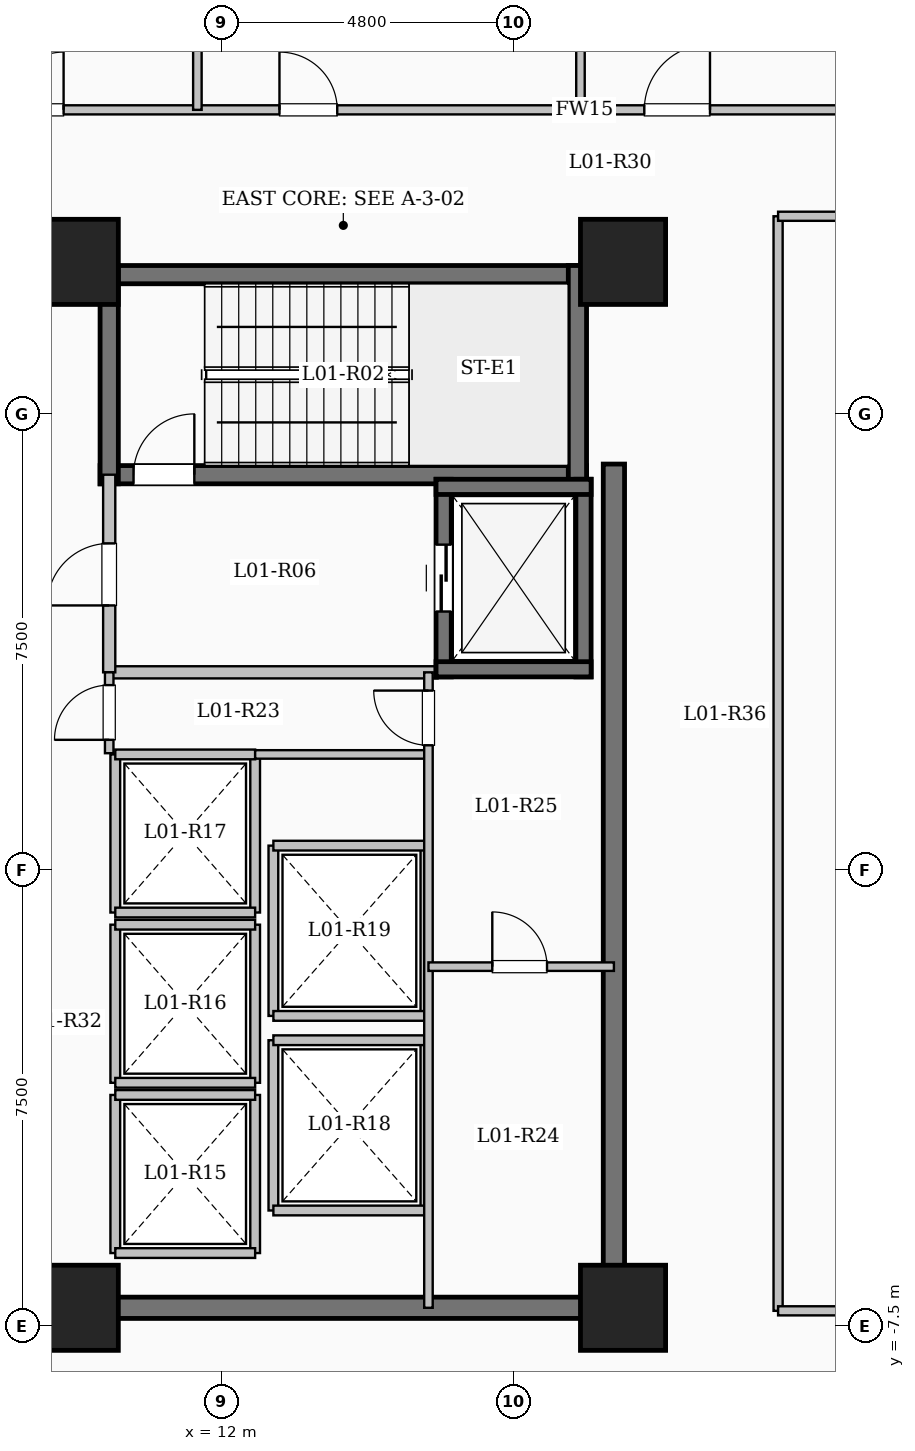
"""IFC4 building model, lengths in metres.
Left out: names, types, materials, properties, quantities, classifications, styles, units other than length and angle.
Written with IfcOpenShell. Run it as: python <this file> out.ifc"""

import sys

from ifc_helpers import new_model, si_unit, direction, frame, frame_2d, origin, origin_2d, place, context, subcontext, project, spatial, rectangle, extrude, element, fill, save


model = new_model("IFC4")
c1 = context("Model", 3, precision=1e-05, world=origin(), true_north=direction((0.0, 1.0)))
c2 = subcontext(c1, "Body", "Model", "MODEL_VIEW")
j1 = project(units=[si_unit("LENGTHUNIT", "METRE"), si_unit("PLANEANGLEUNIT", "RADIAN")], contexts=[c1])
p1 = place(None, origin())
s1 = spatial("IfcSite", under=j1, at=p1, CompositionType="ELEMENT")
p2 = place(p1, origin())
s2 = spatial("IfcBuilding", under=s1, at=p2, CompositionType="ELEMENT")
p3 = place(p2, frame((0.0, 0.0, 5.4)))
s3 = spatial("IfcBuildingStorey", under=s2, at=p3, CompositionType="ELEMENT", Elevation=5.4)
for number, where, z_axis, x_axis in (
    (1, (9.6, -7.2, 0.0), (0.0, 0.0, 1.0), (1.0, 0.0, 0.0)),
    (2, (9.6, 10.0, 0.0), (0.0, 0.0, 1.0), (1.0, 0.0, 0.0)),
    (3, (18.6, -7.2, 0.0), (0.0, 0.0, 1.0), (1.0, 0.0, 0.0)),
    (4, (18.6, 10.0, 0.0), (0.0, 0.0, 1.0), (1.0, 0.0, 0.0)),
):
    element("IfcColumn", number, at=place(p3, frame(where, z_axis=z_axis, x_axis=x_axis)), inside=s3, PredefinedType="COLUMN", context=c2, shape_type="SweptSolid", body=[
        extrude(rectangle(XDim=1.4, YDim=1.4, at=origin_2d()), origin(), (0.0, 0.0, 1.0), 4.5),
    ])
p4 = place(p3, frame((10.0, 9.79, 0.0), z_axis=(0.0, 0.0, 1.0), x_axis=(1.0, 0.0, 0.0)))
e5 = element("IfcWall", 5, at=p4, inside=s3, PredefinedType="SHEAR", context=c2, shape_type="SweptSolid", body=[
    extrude(rectangle(XDim=8.0, YDim=0.3, at=frame_2d((4.0, 0.0))), origin(), (0.0, 0.0, 1.0), 4.5),
])
p5 = place(p3, frame((10.0, 6.5, 0.0), z_axis=(0.0, 0.0, 1.0), x_axis=(1.0, 0.0, 0.0)))
e6 = element("IfcWall", 6, at=p5, inside=s3, PredefinedType="SHEAR", context=c2, shape_type="SweptSolid", body=[
    extrude(rectangle(XDim=8.0, YDim=0.3, at=frame_2d((4.0, 0.0))), origin(), (0.0, 0.0, 1.0), 4.5),
])
p6 = place(p5, frame((0.55, 0.0, 0.0)))
e7 = element("IfcOpeningElement", 7, at=p6, cuts=e6, PredefinedType="OPENING", context=c2, shape_type="SweptSolid", body=[
    extrude(rectangle(XDim=1.0, YDim=2.15, at=frame_2d((0.5, 1.075))), frame((0.0, 0.16, 0.0), z_axis=(0.0, -1.0, 0.0), x_axis=(1.0, 0.0, 0.0)), (0.0, 0.0, 1.0), 0.32),
])
for number, where, z_axis, x_axis in (
    (8, (10.15, 6.35, 0.0), (0.0, 0.0, 1.0), (0.0, 1.0, 0.0)),
    (9, (17.85, 6.35, 0.0), (0.0, 0.0, 1.0), (0.0, 1.0, 0.0)),
):
    element("IfcWall", number, at=place(p3, frame(where, z_axis=z_axis, x_axis=x_axis)), inside=s3, PredefinedType="SHEAR", context=c2, shape_type="SweptSolid", body=[
        extrude(rectangle(XDim=3.59, YDim=0.3, at=frame_2d((1.795, 0.0))), origin(), (0.0, 0.0, 1.0), 4.5),
    ])
p7 = place(p3, frame((10.15, 3.25, 0.0), z_axis=(0.0, 0.0, 1.0), x_axis=(1.0, 0.0, 0.0)))
e10 = element("IfcWall", 10, at=p7, inside=s3, PredefinedType="SOLIDWALL", context=c2, shape_type="SweptSolid", body=[
    extrude(rectangle(XDim=5.4, YDim=0.2, at=frame_2d((2.7, 0.0))), origin(), (0.0, 0.0, 1.0), 4.2),
])
p8 = place(p3, frame((10.15, 3.25, 0.0), z_axis=(0.0, 0.0, 1.0), x_axis=(0.0, 1.0, 0.0)))
e11 = element("IfcWall", 11, at=p8, inside=s3, PredefinedType="SOLIDWALL", context=c2, shape_type="SweptSolid", body=[
    extrude(rectangle(XDim=3.25, YDim=0.2, at=frame_2d((1.625, 0.0))), origin(), (0.0, 0.0, 1.0), 4.2),
])
p9 = place(p8, frame((1.1, 0.0, 0.0)))
e12 = element("IfcOpeningElement", 12, at=p9, cuts=e11, PredefinedType="OPENING", context=c2, shape_type="SweptSolid", body=[
    extrude(rectangle(XDim=1.02, YDim=2.15, at=frame_2d((0.51, 1.075))), frame((0.0, 0.11, 0.0), z_axis=(0.0, -1.0, 0.0), x_axis=(1.0, 0.0, 0.0)), (0.0, 0.0, 1.0), 0.22),
])
p10 = place(p3, frame((15.65, 3.175, 0.0), z_axis=(0.0, 0.0, 1.0), x_axis=(0.0, 1.0, 0.0)))
e13 = element("IfcWall", 13, at=p10, inside=s3, PredefinedType="SHEAR", context=c2, shape_type="SweptSolid", body=[
    extrude(rectangle(XDim=3.25, YDim=0.25, at=frame_2d((1.625, 0.0))), origin(), (0.0, 0.0, 1.0), 4.5),
])
p11 = place(p10, frame((1.075, 0.0, 0.0)))
e14 = element("IfcOpeningElement", 14, at=p11, cuts=e13, PredefinedType="OPENING", context=c2, shape_type="SweptSolid", body=[
    extrude(rectangle(XDim=1.1, YDim=2.15, at=frame_2d((0.55, 1.075))), frame((0.0, 0.135, 0.0), z_axis=(0.0, -1.0, 0.0), x_axis=(1.0, 0.0, 0.0)), (0.0, 0.0, 1.0), 0.27),
])
p12 = place(p3, frame((17.95, 3.175, 0.0), z_axis=(0.0, 0.0, 1.0), x_axis=(0.0, 1.0, 0.0)))
e15 = element("IfcWall", 15, at=p12, inside=s3, PredefinedType="SHEAR", context=c2, shape_type="SweptSolid", body=[
    extrude(rectangle(XDim=3.25, YDim=0.25, at=frame_2d((1.625, 0.0))), origin(), (0.0, 0.0, 1.0), 4.5),
])
for number, where, z_axis, x_axis in (
    (16, (15.525, 3.3, 0.0), (0.0, 0.0, 1.0), (1.0, 0.0, 0.0)),
    (17, (15.525, 6.3, 0.0), (0.0, 0.0, 1.0), (1.0, 0.0, 0.0)),
):
    element("IfcWall", number, at=place(p3, frame(where, z_axis=z_axis, x_axis=x_axis)), inside=s3, PredefinedType="SHEAR", context=c2, shape_type="SweptSolid", body=[
        extrude(rectangle(XDim=2.55, YDim=0.25, at=frame_2d((1.275, 0.0))), origin(), (0.0, 0.0, 1.0), 4.5),
    ])
for number, where, z_axis, x_axis in (
    (18, (10.25, -6.3, 0.0), (0.0, 0.0, 1.0), (0.0, 1.0, 0.0)),
    (19, (12.55, -6.3, 0.0), (0.0, 0.0, 1.0), (0.0, 1.0, 0.0)),
):
    element("IfcWall", number, at=place(p3, frame(where, z_axis=z_axis, x_axis=x_axis)), inside=s3, PredefinedType="SOLIDWALL", context=c2, shape_type="SweptSolid", body=[
        extrude(rectangle(XDim=2.6, YDim=0.16, at=frame_2d((1.3, 0.0))), origin(), (0.0, 0.0, 1.0), 4.2),
    ])
for number, where, z_axis, x_axis in (
    (20, (10.25, -6.3, 0.0), (0.0, 0.0, 1.0), (1.0, 0.0, 0.0)),
    (21, (10.25, -3.7, 0.0), (0.0, 0.0, 1.0), (1.0, 0.0, 0.0)),
):
    element("IfcWall", number, at=place(p3, frame(where, z_axis=z_axis, x_axis=x_axis)), inside=s3, PredefinedType="SOLIDWALL", context=c2, shape_type="SweptSolid", body=[
        extrude(rectangle(XDim=2.3, YDim=0.16, at=frame_2d((1.15, 0.0))), origin(), (0.0, 0.0, 1.0), 4.2),
    ])
for number, where, z_axis, x_axis in (
    (22, (10.25, -3.5, 0.0), (0.0, 0.0, 1.0), (0.0, 1.0, 0.0)),
    (23, (12.55, -3.5, 0.0), (0.0, 0.0, 1.0), (0.0, 1.0, 0.0)),
):
    element("IfcWall", number, at=place(p3, frame(where, z_axis=z_axis, x_axis=x_axis)), inside=s3, PredefinedType="SOLIDWALL", context=c2, shape_type="SweptSolid", body=[
        extrude(rectangle(XDim=2.6, YDim=0.16, at=frame_2d((1.3, 0.0))), origin(), (0.0, 0.0, 1.0), 4.2),
    ])
for number, where, z_axis, x_axis in (
    (24, (10.25, -3.5, 0.0), (0.0, 0.0, 1.0), (1.0, 0.0, 0.0)),
    (25, (10.25, -0.9, 0.0), (0.0, 0.0, 1.0), (1.0, 0.0, 0.0)),
):
    element("IfcWall", number, at=place(p3, frame(where, z_axis=z_axis, x_axis=x_axis)), inside=s3, PredefinedType="SOLIDWALL", context=c2, shape_type="SweptSolid", body=[
        extrude(rectangle(XDim=2.3, YDim=0.16, at=frame_2d((1.15, 0.0))), origin(), (0.0, 0.0, 1.0), 4.2),
    ])
for number, where, z_axis, x_axis in (
    (26, (10.25, -0.7, 0.0), (0.0, 0.0, 1.0), (0.0, 1.0, 0.0)),
    (27, (12.55, -0.7, 0.0), (0.0, 0.0, 1.0), (0.0, 1.0, 0.0)),
):
    element("IfcWall", number, at=place(p3, frame(where, z_axis=z_axis, x_axis=x_axis)), inside=s3, PredefinedType="SOLIDWALL", context=c2, shape_type="SweptSolid", body=[
        extrude(rectangle(XDim=2.6, YDim=0.16, at=frame_2d((1.3, 0.0))), origin(), (0.0, 0.0, 1.0), 4.2),
    ])
for number, where, z_axis, x_axis in (
    (28, (10.25, -0.7, 0.0), (0.0, 0.0, 1.0), (1.0, 0.0, 0.0)),
    (29, (10.25, 1.9, 0.0), (0.0, 0.0, 1.0), (1.0, 0.0, 0.0)),
):
    element("IfcWall", number, at=place(p3, frame(where, z_axis=z_axis, x_axis=x_axis)), inside=s3, PredefinedType="SOLIDWALL", context=c2, shape_type="SweptSolid", body=[
        extrude(rectangle(XDim=2.3, YDim=0.16, at=frame_2d((1.15, 0.0))), origin(), (0.0, 0.0, 1.0), 4.2),
    ])
for number, where, z_axis, x_axis in (
    (30, (12.85, -5.6, 0.0), (0.0, 0.0, 1.0), (0.0, 1.0, 0.0)),
    (31, (15.35, -5.6, 0.0), (0.0, 0.0, 1.0), (0.0, 1.0, 0.0)),
):
    element("IfcWall", number, at=place(p3, frame(where, z_axis=z_axis, x_axis=x_axis)), inside=s3, PredefinedType="SOLIDWALL", context=c2, shape_type="SweptSolid", body=[
        extrude(rectangle(XDim=2.8, YDim=0.16, at=frame_2d((1.4, 0.0))), origin(), (0.0, 0.0, 1.0), 4.2),
    ])
for number, where, z_axis, x_axis in (
    (32, (12.85, -5.6, 0.0), (0.0, 0.0, 1.0), (1.0, 0.0, 0.0)),
    (33, (12.85, -2.8, 0.0), (0.0, 0.0, 1.0), (1.0, 0.0, 0.0)),
):
    element("IfcWall", number, at=place(p3, frame(where, z_axis=z_axis, x_axis=x_axis)), inside=s3, PredefinedType="SOLIDWALL", context=c2, shape_type="SweptSolid", body=[
        extrude(rectangle(XDim=2.5, YDim=0.16, at=frame_2d((1.25, 0.0))), origin(), (0.0, 0.0, 1.0), 4.2),
    ])
for number, where, z_axis, x_axis in (
    (34, (12.85, -2.4, 0.0), (0.0, 0.0, 1.0), (0.0, 1.0, 0.0)),
    (35, (15.35, -2.4, 0.0), (0.0, 0.0, 1.0), (0.0, 1.0, 0.0)),
):
    element("IfcWall", number, at=place(p3, frame(where, z_axis=z_axis, x_axis=x_axis)), inside=s3, PredefinedType="SOLIDWALL", context=c2, shape_type="SweptSolid", body=[
        extrude(rectangle(XDim=2.8, YDim=0.16, at=frame_2d((1.4, 0.0))), origin(), (0.0, 0.0, 1.0), 4.2),
    ])
for number, where, z_axis, x_axis in (
    (36, (12.85, -2.4, 0.0), (0.0, 0.0, 1.0), (1.0, 0.0, 0.0)),
    (37, (12.85, 0.4, 0.0), (0.0, 0.0, 1.0), (1.0, 0.0, 0.0)),
):
    element("IfcWall", number, at=place(p3, frame(where, z_axis=z_axis, x_axis=x_axis)), inside=s3, PredefinedType="SOLIDWALL", context=c2, shape_type="SweptSolid", body=[
        extrude(rectangle(XDim=2.5, YDim=0.16, at=frame_2d((1.25, 0.0))), origin(), (0.0, 0.0, 1.0), 4.2),
    ])
p13 = place(p3, frame((18.45, -7.375, 0.0), z_axis=(0.0, 0.0, 1.0), x_axis=(0.0, 1.0, 0.0)))
e38 = element("IfcWall", 38, at=p13, inside=s3, PredefinedType="SHEAR", context=c2, shape_type="SweptSolid", body=[
    extrude(rectangle(XDim=14.05, YDim=0.35, at=frame_2d((7.025, 0.0))), origin(), (0.0, 0.0, 1.0), 4.5),
])
p14 = place(p3, frame((10.075, -7.2, 0.0), z_axis=(0.0, 0.0, 1.0), x_axis=(1.0, 0.0, 0.0)))
e39 = element("IfcWall", 39, at=p14, inside=s3, PredefinedType="SHEAR", context=c2, shape_type="SweptSolid", body=[
    extrude(rectangle(XDim=8.55, YDim=0.35, at=frame_2d((4.275, 0.0))), origin(), (0.0, 0.0, 1.0), 4.5),
])
p15 = place(p3, frame((12.55, 1.9, 0.0), z_axis=(0.0, 0.0, 1.0), x_axis=(1.0, 0.0, 0.0)))
e40 = element("IfcWall", 40, at=p15, inside=s3, PredefinedType="PARTITIONING", context=c2, shape_type="SweptSolid", body=[
    extrude(rectangle(XDim=2.85, YDim=0.14, at=frame_2d((1.425, 0.0))), origin(), (0.0, 0.0, 1.0), 4.2),
])
p16 = place(p3, frame((10.15, 1.92, 0.0), z_axis=(0.0, 0.0, 1.0), x_axis=(0.0, 1.0, 0.0)))
e41 = element("IfcWall", 41, at=p16, inside=s3, PredefinedType="PARTITIONING", context=c2, shape_type="SweptSolid", body=[
    extrude(rectangle(XDim=1.33, YDim=0.14, at=frame_2d((0.665, 0.0))), origin(), (0.0, 0.0, 1.0), 4.2),
])
p17 = place(p16, frame((0.22, 0.0, 0.0)))
e42 = element("IfcOpeningElement", 42, at=p17, cuts=e41, PredefinedType="OPENING", context=c2, shape_type="SweptSolid", body=[
    extrude(rectangle(XDim=0.9, YDim=2.08, at=frame_2d((0.45, 1.04))), frame((0.0, 0.08, 0.0), z_axis=(0.0, -1.0, 0.0), x_axis=(1.0, 0.0, 0.0)), (0.0, 0.0, 1.0), 0.16),
])
p18 = place(p3, frame((15.4, -7.2, 0.0), z_axis=(0.0, 0.0, 1.0), x_axis=(0.0, 1.0, 0.0)))
e43 = element("IfcWall", 43, at=p18, inside=s3, PredefinedType="PARTITIONING", context=c2, shape_type="SweptSolid", body=[
    extrude(rectangle(XDim=10.45, YDim=0.14, at=frame_2d((5.225, 0.0))), origin(), (0.0, 0.0, 1.0), 4.2),
])
p19 = place(p18, frame((9.25, 0.0, 0.0)))
e44 = element("IfcOpeningElement", 44, at=p19, cuts=e43, PredefinedType="OPENING", context=c2, shape_type="SweptSolid", body=[
    extrude(rectangle(XDim=0.9, YDim=2.08, at=frame_2d((0.45, 1.04))), frame((0.0, 0.08, 0.0), z_axis=(0.0, -1.0, 0.0), x_axis=(1.0, 0.0, 0.0)), (0.0, 0.0, 1.0), 0.16),
])
p20 = place(p3, frame((15.4, -1.59, 0.0), z_axis=(0.0, 0.0, 1.0), x_axis=(1.0, 0.0, 0.0)))
e45 = element("IfcWall", 45, at=p20, inside=s3, PredefinedType="PARTITIONING", context=c2, shape_type="SweptSolid", body=[
    extrude(rectangle(XDim=3.05, YDim=0.14, at=frame_2d((1.525, 0.0))), origin(), (0.0, 0.0, 1.0), 4.2),
])
p21 = place(p20, frame((1.05, 0.0, 0.0)))
e46 = element("IfcOpeningElement", 46, at=p21, cuts=e45, PredefinedType="OPENING", context=c2, shape_type="SweptSolid", body=[
    extrude(rectangle(XDim=0.9, YDim=2.08, at=frame_2d((0.45, 1.04))), frame((0.0, 0.08, 0.0), z_axis=(0.0, -1.0, 0.0), x_axis=(1.0, 0.0, 0.0)), (0.0, 0.0, 1.0), 0.16),
])
p22 = place(p3, frame((3.85, 12.5, 0.0), z_axis=(0.0, 0.0, 1.0), x_axis=(1.0, 0.0, 0.0)))
e47 = element("IfcWall", 47, at=p22, inside=s3, PredefinedType="PARTITIONING", context=c2, shape_type="SweptSolid", body=[
    extrude(rectangle(XDim=29.03, YDim=0.15, at=frame_2d((14.515, 0.0))), origin(), (0.0, 0.0, 1.0), 4.2),
])
p23 = place(p22, frame((1.2, 0.0, 0.0)))
e48 = element("IfcOpeningElement", 48, at=p23, cuts=e47, PredefinedType="OPENING", context=c2, shape_type="SweptSolid", body=[
    extrude(rectangle(XDim=0.95, YDim=2.15, at=frame_2d((0.475, 1.075))), frame((0.0, 0.085, 0.0), z_axis=(0.0, -1.0, 0.0), x_axis=(1.0, 0.0, 0.0)), (0.0, 0.0, 1.0), 0.17),
])
p24 = place(p22, frame((4.6, 0.0, 0.0)))
e49 = element("IfcOpeningElement", 49, at=p24, cuts=e47, PredefinedType="OPENING", context=c2, shape_type="SweptSolid", body=[
    extrude(rectangle(XDim=0.95, YDim=2.15, at=frame_2d((0.475, 1.075))), frame((0.0, 0.085, 0.0), z_axis=(0.0, -1.0, 0.0), x_axis=(1.0, 0.0, 0.0)), (0.0, 0.0, 1.0), 0.17),
])
p25 = place(p22, frame((9.1, 0.0, 0.0)))
e50 = element("IfcOpeningElement", 50, at=p25, cuts=e47, PredefinedType="OPENING", context=c2, shape_type="SweptSolid", body=[
    extrude(rectangle(XDim=0.95, YDim=2.15, at=frame_2d((0.475, 1.075))), frame((0.0, 0.085, 0.0), z_axis=(0.0, -1.0, 0.0), x_axis=(1.0, 0.0, 0.0)), (0.0, 0.0, 1.0), 0.17),
])
p26 = place(p22, frame((15.1, 0.0, 0.0)))
e51 = element("IfcOpeningElement", 51, at=p26, cuts=e47, PredefinedType="OPENING", context=c2, shape_type="SweptSolid", body=[
    extrude(rectangle(XDim=1.08, YDim=2.15, at=frame_2d((0.54, 1.075))), frame((0.0, 0.085, 0.0), z_axis=(0.0, -1.0, 0.0), x_axis=(1.0, 0.0, 0.0)), (0.0, 0.0, 1.0), 0.17),
])
p27 = place(p22, frame((25.93, 0.0, 0.0)))
e52 = element("IfcOpeningElement", 52, at=p27, cuts=e47, PredefinedType="OPENING", context=c2, shape_type="SweptSolid", body=[
    extrude(rectangle(XDim=1.08, YDim=2.15, at=frame_2d((0.54, 1.075))), frame((0.0, 0.085, 0.0), z_axis=(0.0, -1.0, 0.0), x_axis=(1.0, 0.0, 0.0)), (0.0, 0.0, 1.0), 0.17),
])
p28 = place(p3, frame((21.15, -7.25, 0.0), z_axis=(0.0, 0.0, 1.0), x_axis=(0.0, 1.0, 0.0)))
e53 = element("IfcWall", 53, at=p28, inside=s3, PredefinedType="PARTITIONING", context=c2, shape_type="SweptSolid", body=[
    extrude(rectangle(XDim=18.0, YDim=0.15, at=frame_2d((9.0, 0.0))), origin(), (0.0, 0.0, 1.0), 4.2),
])
p29 = place(p3, frame((11.6, 12.5, 0.0), z_axis=(0.0, 0.0, 1.0), x_axis=(0.0, 1.0, 0.0)))
e54 = element("IfcWall", 54, at=p29, inside=s3, PredefinedType="PARTITIONING", context=c2, shape_type="SweptSolid", body=[
    extrude(rectangle(XDim=17.38, YDim=0.14, at=frame_2d((8.69, 0.0))), origin(), (0.0, 0.0, 1.0), 4.2),
])
p30 = place(p3, frame((17.9, 12.5, 0.0), z_axis=(0.0, 0.0, 1.0), x_axis=(0.0, 1.0, 0.0)))
e55 = element("IfcWall", 55, at=p30, inside=s3, PredefinedType="PARTITIONING", context=c2, shape_type="SweptSolid", body=[
    extrude(rectangle(XDim=17.38, YDim=0.14, at=frame_2d((8.69, 0.0))), origin(), (0.0, 0.0, 1.0), 3.385),
])
p31 = place(p3, frame((21.15, -7.25, 0.0), z_axis=(0.0, 0.0, 1.0), x_axis=(1.0, 0.0, 0.0)))
e56 = element("IfcWall", 56, at=p31, inside=s3, PredefinedType="PARTITIONING", context=c2, shape_type="SweptSolid", body=[
    extrude(rectangle(XDim=11.73, YDim=0.15, at=frame_2d((5.865, 0.0))), origin(), (0.0, 0.0, 1.0), 4.2),
])
p32 = place(p31, frame((2.5, 0.0, 0.0)))
e57 = element("IfcOpeningElement", 57, at=p32, cuts=e56, PredefinedType="OPENING", context=c2, shape_type="SweptSolid", body=[
    extrude(rectangle(XDim=1.08, YDim=2.15, at=frame_2d((0.54, 1.075))), frame((0.0, 0.085, 0.0), z_axis=(0.0, -1.0, 0.0), x_axis=(1.0, 0.0, 0.0)), (0.0, 0.0, 1.0), 0.17),
])
p33 = place(p3, frame((21.15, 10.75, 0.0), z_axis=(0.0, 0.0, 1.0), x_axis=(1.0, 0.0, 0.0)))
e58 = element("IfcWall", 58, at=p33, inside=s3, PredefinedType="PARTITIONING", context=c2, shape_type="SweptSolid", body=[
    extrude(rectangle(XDim=11.73, YDim=0.15, at=frame_2d((5.865, 0.0))), origin(), (0.0, 0.0, 1.0), 4.2),
])
p34 = place(p6, origin())
e59 = element("IfcDoor", 59, at=p34, inside=s3, OperationType="SINGLE_SWING_RIGHT", PredefinedType="DOOR", context=c2, shape_type="SweptSolid", body=[
    extrude(rectangle(XDim=1.0, YDim=2.15, at=frame_2d((0.5, 1.075))), frame((0.0, 0.025, 0.0), z_axis=(0.0, -1.0, 0.0), x_axis=(1.0, 0.0, 0.0)), (0.0, 0.0, 1.0), 0.05),
])
fill(e7, e59)
p35 = place(p9, origin())
e60 = element("IfcDoor", 60, at=p35, inside=s3, OperationType="SINGLE_SWING_LEFT", PredefinedType="DOOR", context=c2, shape_type="SweptSolid", body=[
    extrude(rectangle(XDim=1.02, YDim=2.15, at=frame_2d((0.51, 1.075))), frame((0.0, 0.025, 0.0), z_axis=(0.0, -1.0, 0.0), x_axis=(1.0, 0.0, 0.0)), (0.0, 0.0, 1.0), 0.05),
])
fill(e12, e60)
p36 = place(p11, origin())
e61 = element("IfcDoor", 61, at=p36, inside=s3, OperationType="SLIDING_TO_LEFT", PredefinedType="DOOR", context=c2, shape_type="SweptSolid", body=[
    extrude(rectangle(XDim=1.1, YDim=2.15, at=frame_2d((0.55, 1.075))), frame((0.0, 0.025, 0.0), z_axis=(0.0, -1.0, 0.0), x_axis=(1.0, 0.0, 0.0)), (0.0, 0.0, 1.0), 0.05),
])
fill(e14, e61)
p37 = place(p17, origin())
e62 = element("IfcDoor", 62, at=p37, inside=s3, OperationType="SINGLE_SWING_LEFT", PredefinedType="DOOR", context=c2, shape_type="SweptSolid", body=[
    extrude(rectangle(XDim=0.9, YDim=2.08, at=frame_2d((0.45, 1.04))), frame((0.0, 0.025, 0.0), z_axis=(0.0, -1.0, 0.0), x_axis=(1.0, 0.0, 0.0)), (0.0, 0.0, 1.0), 0.05),
])
fill(e42, e62)
p38 = place(p19, origin())
e63 = element("IfcDoor", 63, at=p38, inside=s3, OperationType="SINGLE_SWING_RIGHT", PredefinedType="DOOR", context=c2, shape_type="SweptSolid", body=[
    extrude(rectangle(XDim=0.9, YDim=2.08, at=frame_2d((0.45, 1.04))), frame((0.0, 0.025, 0.0), z_axis=(0.0, -1.0, 0.0), x_axis=(1.0, 0.0, 0.0)), (0.0, 0.0, 1.0), 0.05),
])
fill(e44, e63)
p39 = place(p21, origin())
e64 = element("IfcDoor", 64, at=p39, inside=s3, OperationType="SINGLE_SWING_LEFT", PredefinedType="DOOR", context=c2, shape_type="SweptSolid", body=[
    extrude(rectangle(XDim=0.9, YDim=2.08, at=frame_2d((0.45, 1.04))), frame((0.0, 0.025, 0.0), z_axis=(0.0, -1.0, 0.0), x_axis=(1.0, 0.0, 0.0)), (0.0, 0.0, 1.0), 0.05),
])
fill(e46, e64)
p40 = place(p24, origin())
e65 = element("IfcDoor", 65, at=p40, inside=s3, OperationType="SINGLE_SWING_RIGHT", PredefinedType="DOOR", context=c2, shape_type="SweptSolid", body=[
    extrude(rectangle(XDim=0.95, YDim=2.15, at=frame_2d((0.475, 1.075))), frame((0.0, 0.025, 0.0), z_axis=(0.0, -1.0, 0.0), x_axis=(1.0, 0.0, 0.0)), (0.0, 0.0, 1.0), 0.05),
])
fill(e49, e65)
p41 = place(p25, origin())
e66 = element("IfcDoor", 66, at=p41, inside=s3, OperationType="SINGLE_SWING_LEFT", PredefinedType="DOOR", context=c2, shape_type="SweptSolid", body=[
    extrude(rectangle(XDim=0.95, YDim=2.15, at=frame_2d((0.475, 1.075))), frame((0.0, 0.025, 0.0), z_axis=(0.0, -1.0, 0.0), x_axis=(1.0, 0.0, 0.0)), (0.0, 0.0, 1.0), 0.05),
])
fill(e50, e66)
p42 = place(p26, origin())
e67 = element("IfcDoor", 67, at=p42, inside=s3, OperationType="SINGLE_SWING_RIGHT", PredefinedType="DOOR", context=c2, shape_type="SweptSolid", body=[
    extrude(rectangle(XDim=1.08, YDim=2.15, at=frame_2d((0.54, 1.075))), frame((0.0, 0.025, 0.0), z_axis=(0.0, -1.0, 0.0), x_axis=(1.0, 0.0, 0.0)), (0.0, 0.0, 1.0), 0.05),
])
fill(e51, e67)
save(model, sys.argv[1])
